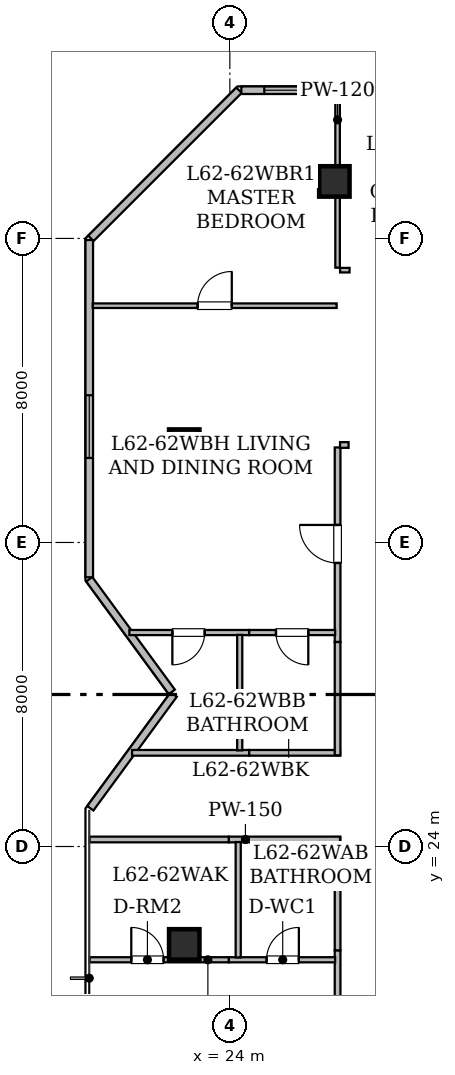
"""IFC4 building model, lengths in metres.
Left out: names, types, materials, properties, quantities, classifications, styles, units other than length and angle.
Written with IfcOpenShell. Run it as: python <this file> out.ifc"""

import sys

from ifc_helpers import new_model, si_unit, direction, frame, frame_2d, origin, origin_2d, place, context, subcontext, project, spatial, rectangle, hollow_rectangle, extrude, element, fill, save


model = new_model("IFC4")
c1 = context("Model", 3, precision=1e-05, world=origin(), true_north=direction((0.0, 1.0)))
c2 = subcontext(c1, "Body", "Model", "MODEL_VIEW")
j1 = project(units=[si_unit("LENGTHUNIT", "METRE"), si_unit("PLANEANGLEUNIT", "RADIAN")], contexts=[c1])
p1 = place(None, origin())
s1 = spatial("IfcSite", under=j1, at=p1, CompositionType="ELEMENT")
p2 = place(p1, origin())
s2 = spatial("IfcBuilding", under=s1, at=p2, CompositionType="ELEMENT")
p3 = place(p2, frame((0.0, 0.0, 242.75)))
s3 = spatial("IfcBuildingStorey", under=s2, at=p3, CompositionType="ELEMENT", Elevation=242.75)
for number, where, z_axis, x_axis in (
    (1, (26.75, 41.5, 0.0), (0.0, 0.0, 1.0), (1.0, 0.0, 0.0)),
    (2, (22.8, 21.425, 0.0), (0.0, 0.0, 1.0), (1.0, 0.0, 0.0)),
    (3, (22.8, 34.575, 0.0), (0.0, 0.0, 1.0), (1.0, 0.0, 0.0)),
):
    element("IfcColumn", number, at=place(p3, frame(where, z_axis=z_axis, x_axis=x_axis)), inside=s3, PredefinedType="COLUMN", context=c2, shape_type="SweptSolid", body=[
        extrude(hollow_rectangle(XDim=0.8, YDim=0.8, WallThickness=0.04, at=origin_2d()), origin(), (0.0, 0.0, 1.0), 3.65),
    ])
p4 = place(p3, frame((20.329, 25.007, 0.0), z_axis=(0.0, 0.0, 1.0), x_axis=(0.591366515379, 0.806402904564, 0.0)))
e4 = element("IfcWall", 4, at=p4, inside=s3, PredefinedType="STANDARD", context=c2, shape_type="SweptSolid", body=[
    extrude(rectangle(XDim=3.711, YDim=0.2, at=frame_2d((1.856, 0.0))), origin(), (0.0, 0.0, 1.0), 3.43),
])
p5 = place(p3, frame((22.473, 28.069, 0.0), z_axis=(0.0, 0.0, 1.0), x_axis=(-0.591248456881, 0.80648946815, 0.0)))
e5 = element("IfcWall", 5, at=p5, inside=s3, PredefinedType="STANDARD", context=c2, shape_type="SweptSolid", body=[
    extrude(rectangle(XDim=3.675, YDim=0.2, at=frame_2d((1.837, 0.0))), origin(), (0.0, 0.0, 1.0), 3.43),
])
p6 = place(p3, frame((20.3, 31.084, 0.0), z_axis=(0.0, 0.0, 1.0), x_axis=(0.0, 1.0, 0.0)))
e6 = element("IfcWall", 6, at=p6, inside=s3, PredefinedType="STANDARD", context=c2, shape_type="SweptSolid", body=[
    extrude(rectangle(XDim=8.875, YDim=0.2, at=frame_2d((4.438, 0.0))), origin(), (0.0, 0.0, 1.0), 3.43),
])
p7 = place(p6, frame((3.14, 0.0, 0.85)))
e7 = element("IfcOpeningElement", 7, at=p7, cuts=e6, PredefinedType="OPENING", context=c2, shape_type="SweptSolid", body=[
    extrude(rectangle(XDim=1.65, YDim=1.55, at=frame_2d((0.825, 0.775))), frame((0.0, 0.11, 0.0), z_axis=(0.0, -1.0, 0.0), x_axis=(1.0, 0.0, 0.0)), (0.0, 0.0, 1.0), 0.22),
])
p8 = place(p3, frame((20.344, 40.003, 0.0), z_axis=(0.0, 0.0, 1.0), x_axis=(0.707106781187, 0.707106781187, 0.0)))
e8 = element("IfcWall", 8, at=p8, inside=s3, PredefinedType="STANDARD", context=c2, shape_type="SweptSolid", body=[
    extrude(rectangle(XDim=5.511, YDim=0.2, at=frame_2d((2.756, 0.0))), origin(), (0.0, 0.0, 1.0), 3.43),
])
p9 = place(p3, frame((24.302, 43.9, 0.0), z_axis=(0.0, 0.0, 1.0), x_axis=(1.0, 0.0, 0.0)))
e9 = element("IfcWall", 9, at=p9, inside=s3, PredefinedType="STANDARD", context=c2, shape_type="SweptSolid", body=[
    extrude(rectangle(XDim=41.457, YDim=0.2, at=frame_2d((20.729, 0.0))), origin(), (0.0, 0.0, 1.0), 3.43),
])
p10 = place(p9, frame((5.573, 0.0, 0.85)))
e10 = element("IfcOpeningElement", 10, at=p10, cuts=e9, PredefinedType="OPENING", context=c2, shape_type="SweptSolid", body=[
    extrude(rectangle(XDim=1.65, YDim=1.55, at=frame_2d((0.825, 0.775))), frame((0.0, 0.11, 0.0), z_axis=(0.0, -1.0, 0.0), x_axis=(1.0, 0.0, 0.0)), (0.0, 0.0, 1.0), 0.22),
])
p11 = place(p9, frame((0.604, 0.0, 0.85)))
e11 = element("IfcOpeningElement", 11, at=p11, cuts=e9, PredefinedType="OPENING", context=c2, shape_type="SweptSolid", body=[
    extrude(rectangle(XDim=1.65, YDim=1.55, at=frame_2d((0.825, 0.775))), frame((0.0, 0.11, 0.0), z_axis=(0.0, -1.0, 0.0), x_axis=(1.0, 0.0, 0.0)), (0.0, 0.0, 1.0), 0.22),
])
p12 = place(p9, frame((23.188, 0.0, 0.8)))
e12 = element("IfcOpeningElement", 12, at=p12, cuts=e9, PredefinedType="OPENING", context=c2, shape_type="SweptSolid", body=[
    extrude(rectangle(XDim=1.2, YDim=1.5, at=frame_2d((0.6, 0.75))), frame((0.0, 0.11, 0.0), z_axis=(0.0, -1.0, 0.0), x_axis=(1.0, 0.0, 0.0)), (0.0, 0.0, 1.0), 0.22),
])
p13 = place(p9, frame((19.333, 0.0, 0.85)))
e13 = element("IfcOpeningElement", 13, at=p13, cuts=e9, PredefinedType="OPENING", context=c2, shape_type="SweptSolid", body=[
    extrude(rectangle(XDim=1.65, YDim=1.55, at=frame_2d((0.825, 0.775))), frame((0.0, 0.11, 0.0), z_axis=(0.0, -1.0, 0.0), x_axis=(1.0, 0.0, 0.0)), (0.0, 0.0, 1.0), 0.22),
])
p14 = place(p9, frame((26.593, 0.0, 0.85)))
e14 = element("IfcOpeningElement", 14, at=p14, cuts=e9, PredefinedType="OPENING", context=c2, shape_type="SweptSolid", body=[
    extrude(rectangle(XDim=1.65, YDim=1.55, at=frame_2d((0.825, 0.775))), frame((0.0, 0.11, 0.0), z_axis=(0.0, -1.0, 0.0), x_axis=(1.0, 0.0, 0.0)), (0.0, 0.0, 1.0), 0.22),
])
p15 = place(p9, frame((32.843, 0.0, 0.85)))
e15 = element("IfcOpeningElement", 15, at=p15, cuts=e9, PredefinedType="OPENING", context=c2, shape_type="SweptSolid", body=[
    extrude(rectangle(XDim=1.65, YDim=1.55, at=frame_2d((0.825, 0.775))), frame((0.0, 0.11, 0.0), z_axis=(0.0, -1.0, 0.0), x_axis=(1.0, 0.0, 0.0)), (0.0, 0.0, 1.0), 0.22),
])
p16 = place(p3, frame((26.835, 16.9, 0.0), z_axis=(0.0, 0.0, 1.0), x_axis=(0.0, 1.0, 0.0)))
e16 = element("IfcWall", 16, at=p16, inside=s3, PredefinedType="STANDARD", context=c2, shape_type="SweptSolid", body=[
    extrude(rectangle(XDim=4.369, YDim=0.15, at=frame_2d((2.185, 0.0))), origin(), (0.0, 0.0, 1.0), 2.725),
])
p17 = place(p16, frame((1.663, 0.0, 0.0)))
e17 = element("IfcOpeningElement", 17, at=p17, cuts=e16, PredefinedType="OPENING", context=c2, shape_type="SweptSolid", body=[
    extrude(rectangle(XDim=1.0, YDim=2.15, at=frame_2d((0.5, 1.075))), frame((0.0, 0.085, 0.0), z_axis=(0.0, -1.0, 0.0), x_axis=(1.0, 0.0, 0.0)), (0.0, 0.0, 1.0), 0.17),
])
p18 = place(p3, frame((26.835, 21.269, 0.0), z_axis=(0.0, 0.0, 1.0), x_axis=(0.0, 1.0, 0.0)))
e18 = element("IfcWall", 18, at=p18, inside=s3, PredefinedType="STANDARD", context=c2, shape_type="SweptSolid", body=[
    extrude(rectangle(XDim=2.981, YDim=0.15, at=frame_2d((1.49, 0.0))), origin(), (0.0, 0.0, 1.0), 3.43),
])
p19 = place(p3, frame((26.898, 24.185, 0.0), z_axis=(0.0, 0.0, 1.0), x_axis=(-1.0, 0.0, 0.0)))
e19 = element("IfcWall", 19, at=p19, inside=s3, PredefinedType="STANDARD", context=c2, shape_type="SweptSolid", body=[
    extrude(rectangle(XDim=2.927, YDim=0.15, at=frame_2d((1.463, 0.0))), origin(), (0.0, 0.0, 1.0), 3.43),
])
p20 = place(p3, frame((23.971, 24.185, 0.0), z_axis=(0.0, 0.0, 1.0), x_axis=(-1.0, 0.0, 0.0)))
e20 = element("IfcWall", 20, at=p20, inside=s3, PredefinedType="STANDARD", context=c2, shape_type="SweptSolid", body=[
    extrude(rectangle(XDim=3.661, YDim=0.15, at=frame_2d((1.831, 0.0))), origin(), (0.0, 0.0, 1.0), 2.887),
])
p21 = place(p3, frame((26.835, 29.381, 0.0), z_axis=(0.0, 0.0, 1.0), x_axis=(0.0, 1.0, 0.0)))
e21 = element("IfcWall", 21, at=p21, inside=s3, PredefinedType="STANDARD", context=c2, shape_type="SweptSolid", body=[
    extrude(rectangle(XDim=5.119, YDim=0.15, at=frame_2d((2.56, 0.0))), origin(), (0.0, 0.0, 1.0), 3.107),
])
p22 = place(p21, frame((2.08, 0.0, 0.0)))
e22 = element("IfcOpeningElement", 22, at=p22, cuts=e21, PredefinedType="OPENING", context=c2, shape_type="SweptSolid", body=[
    extrude(rectangle(XDim=1.0, YDim=2.15, at=frame_2d((0.5, 1.075))), frame((0.0, 0.085, 0.0), z_axis=(0.0, -1.0, 0.0), x_axis=(1.0, 0.0, 0.0)), (0.0, 0.0, 1.0), 0.17),
])
p23 = place(p3, frame((26.9, 34.565, 0.0), z_axis=(0.0, 0.0, 1.0), x_axis=(1.0, 0.0, 0.0)))
e23 = element("IfcWall", 23, at=p23, inside=s3, PredefinedType="STANDARD", context=c2, shape_type="SweptSolid", body=[
    extrude(rectangle(XDim=0.224, YDim=0.15, at=frame_2d((0.112, 0.0))), origin(), (0.0, 0.0, 1.0), 3.43),
])
p24 = place(p3, frame((21.427, 26.465, 0.0), z_axis=(0.0, 0.0, 1.0), x_axis=(1.0, 0.0, 0.0)))
e24 = element("IfcWall", 24, at=p24, inside=s3, PredefinedType="STANDARD", context=c2, shape_type="SweptSolid", body=[
    extrude(rectangle(XDim=3.082, YDim=0.15, at=frame_2d((1.541, 0.0))), origin(), (0.0, 0.0, 1.0), 2.887),
])
p25 = place(p3, frame((24.509, 26.465, 0.0), z_axis=(0.0, 0.0, 1.0), x_axis=(1.0, 0.0, 0.0)))
e25 = element("IfcWall", 25, at=p25, inside=s3, PredefinedType="STANDARD", context=c2, shape_type="SweptSolid", body=[
    extrude(rectangle(XDim=2.391, YDim=0.15, at=frame_2d((1.195, 0.0))), origin(), (0.0, 0.0, 1.0), 3.43),
])
p26 = place(p3, frame((26.835, 26.4, 0.0), z_axis=(0.0, 0.0, 1.0), x_axis=(0.0, 1.0, 0.0)))
e26 = element("IfcWall", 26, at=p26, inside=s3, PredefinedType="STANDARD", context=c2, shape_type="SweptSolid", body=[
    extrude(rectangle(XDim=2.981, YDim=0.15, at=frame_2d((1.491, 0.0))), origin(), (0.0, 0.0, 1.0), 3.43),
])
p27 = place(p3, frame((27.15, 39.165, 0.0), z_axis=(0.0, 0.0, 1.0), x_axis=(-1.0, 0.0, 0.0)))
e27 = element("IfcWall", 27, at=p27, inside=s3, PredefinedType="PARTITIONING", context=c2, shape_type="SweptSolid", body=[
    extrude(rectangle(XDim=0.25, YDim=0.12, at=frame_2d((0.125, 0.0))), origin(), (0.0, 0.0, 1.0), 3.43),
])
p28 = place(p3, frame((26.835, 39.23, 0.0), z_axis=(0.0, 0.0, 1.0), x_axis=(0.0, 1.0, 0.0)))
e28 = element("IfcWall", 28, at=p28, inside=s3, PredefinedType="PARTITIONING", context=c2, shape_type="SweptSolid", body=[
    extrude(rectangle(XDim=4.578, YDim=0.12, at=frame_2d((2.289, 0.0))), origin(), (0.0, 0.0, 1.0), 2.725),
])
p29 = place(p3, frame((23.971, 21.02, 0.0), z_axis=(0.0, 0.0, 1.0), x_axis=(1.0, 0.0, 0.0)))
e29 = element("IfcWall", 29, at=p29, inside=s3, PredefinedType="PARTITIONING", context=c2, shape_type="SweptSolid", body=[
    extrude(rectangle(XDim=2.799, YDim=0.135, at=frame_2d((1.399, 0.0))), origin(), (0.0, 0.0, 1.0), 2.725),
])
p30 = place(p29, frame((0.995, 0.0, 0.0)))
e30 = element("IfcOpeningElement", 30, at=p30, cuts=e29, PredefinedType="OPENING", context=c2, shape_type="SweptSolid", body=[
    extrude(rectangle(XDim=0.85, YDim=2.1, at=frame_2d((0.425, 1.05))), frame((0.0, 0.077, 0.0), z_axis=(0.0, -1.0, 0.0), x_axis=(1.0, 0.0, 0.0)), (0.0, 0.0, 1.0), 0.155),
])
p31 = place(p3, frame((20.31, 21.02, 0.0), z_axis=(0.0, 0.0, 1.0), x_axis=(1.0, 0.0, 0.0)))
e31 = element("IfcWall", 31, at=p31, inside=s3, PredefinedType="PARTITIONING", context=c2, shape_type="SweptSolid", body=[
    extrude(rectangle(XDim=3.661, YDim=0.135, at=frame_2d((1.831, 0.0))), origin(), (0.0, 0.0, 1.0), 2.725),
])
p32 = place(p31, frame((1.096, 0.0, 0.0)))
e32 = element("IfcOpeningElement", 32, at=p32, cuts=e31, PredefinedType="OPENING", context=c2, shape_type="SweptSolid", body=[
    extrude(rectangle(XDim=0.85, YDim=2.1, at=frame_2d((0.425, 1.05))), frame((0.0, 0.077, 0.0), z_axis=(0.0, -1.0, 0.0), x_axis=(1.0, 0.0, 0.0)), (0.0, 0.0, 1.0), 0.155),
])
p33 = place(p3, frame((24.22, 21.081, 0.0), z_axis=(0.0, 0.0, 1.0), x_axis=(0.0, 1.0, 0.0)))
e33 = element("IfcWall", 33, at=p33, inside=s3, PredefinedType="PARTITIONING", context=c2, shape_type="SweptSolid", body=[
    extrude(rectangle(XDim=3.037, YDim=0.135, at=frame_2d((1.519, 0.0))), origin(), (0.0, 0.0, 1.0), 3.43),
])
p34 = place(p3, frame((24.509, 29.63, 0.0), z_axis=(0.0, 0.0, 1.0), x_axis=(-1.0, 0.0, 0.0)))
e34 = element("IfcWall", 34, at=p34, inside=s3, PredefinedType="PARTITIONING", context=c2, shape_type="SweptSolid", body=[
    extrude(rectangle(XDim=3.153, YDim=0.135, at=frame_2d((1.577, 0.0))), origin(), (0.0, 0.0, 1.0), 2.887),
])
p35 = place(p34, frame((1.172, 0.0, 0.0)))
e35 = element("IfcOpeningElement", 35, at=p35, cuts=e34, PredefinedType="OPENING", context=c2, shape_type="SweptSolid", body=[
    extrude(rectangle(XDim=0.85, YDim=2.1, at=frame_2d((0.425, 1.05))), frame((0.0, 0.077, 0.0), z_axis=(0.0, -1.0, 0.0), x_axis=(1.0, 0.0, 0.0)), (0.0, 0.0, 1.0), 0.155),
])
p36 = place(p3, frame((26.77, 29.63, 0.0), z_axis=(0.0, 0.0, 1.0), x_axis=(-1.0, 0.0, 0.0)))
e36 = element("IfcWall", 36, at=p36, inside=s3, PredefinedType="PARTITIONING", context=c2, shape_type="SweptSolid", body=[
    extrude(rectangle(XDim=2.261, YDim=0.135, at=frame_2d((1.13, 0.0))), origin(), (0.0, 0.0, 1.0), 3.43),
])
p37 = place(p36, frame((0.706, 0.0, 0.0)))
e37 = element("IfcOpeningElement", 37, at=p37, cuts=e36, PredefinedType="OPENING", context=c2, shape_type="SweptSolid", body=[
    extrude(rectangle(XDim=0.85, YDim=2.1, at=frame_2d((0.425, 1.05))), frame((0.0, 0.077, 0.0), z_axis=(0.0, -1.0, 0.0), x_axis=(1.0, 0.0, 0.0)), (0.0, 0.0, 1.0), 0.155),
])
p38 = place(p3, frame((20.392, 38.23, 0.0), z_axis=(0.0, 0.0, 1.0), x_axis=(1.0, 0.0, 0.0)))
e38 = element("IfcWall", 38, at=p38, inside=s3, PredefinedType="PARTITIONING", context=c2, shape_type="SweptSolid", body=[
    extrude(rectangle(XDim=6.418, YDim=0.12, at=frame_2d((3.209, 0.0))), origin(), (0.0, 0.0, 1.0), 2.887),
])
p39 = place(p38, frame((2.759, 0.0, 0.0)))
e39 = element("IfcOpeningElement", 39, at=p39, cuts=e38, PredefinedType="OPENING", context=c2, shape_type="SweptSolid", body=[
    extrude(rectangle(XDim=0.9, YDim=2.1, at=frame_2d((0.45, 1.05))), frame((0.0, 0.07, 0.0), z_axis=(0.0, -1.0, 0.0), x_axis=(1.0, 0.0, 0.0)), (0.0, 0.0, 1.0), 0.14),
])
p40 = place(p3, frame((24.26, 29.569, 0.0), z_axis=(0.0, 0.0, 1.0), x_axis=(0.0, -1.0, 0.0)))
e40 = element("IfcWall", 40, at=p40, inside=s3, PredefinedType="PARTITIONING", context=c2, shape_type="SweptSolid", body=[
    extrude(rectangle(XDim=3.039, YDim=0.135, at=frame_2d((1.52, 0.0))), origin(), (0.0, 0.0, 1.0), 3.43),
])
p41 = place(p7, origin())
e41 = element("IfcWindow", 41, at=p41, inside=s3, PartitioningType="SINGLE_PANEL", PredefinedType="WINDOW", context=c2, shape_type="SweptSolid", body=[
    extrude(rectangle(XDim=1.65, YDim=1.55, at=frame_2d((0.825, 0.775))), frame((0.0, 0.03, 0.0), z_axis=(0.0, -1.0, 0.0), x_axis=(1.0, 0.0, 0.0)), (0.0, 0.0, 1.0), 0.06),
])
fill(e7, e41)
p42 = place(p11, origin())
e42 = element("IfcWindow", 42, at=p42, inside=s3, PartitioningType="SINGLE_PANEL", PredefinedType="WINDOW", context=c2, shape_type="SweptSolid", body=[
    extrude(rectangle(XDim=1.65, YDim=1.55, at=frame_2d((0.825, 0.775))), frame((0.0, 0.03, 0.0), z_axis=(0.0, -1.0, 0.0), x_axis=(1.0, 0.0, 0.0)), (0.0, 0.0, 1.0), 0.06),
])
fill(e11, e42)
p43 = place(p22, origin())
e43 = element("IfcDoor", 43, at=p43, inside=s3, OperationType="SINGLE_SWING_RIGHT", PredefinedType="DOOR", context=c2, shape_type="SweptSolid", body=[
    extrude(rectangle(XDim=1.0, YDim=2.15, at=frame_2d((0.5, 1.075))), frame((0.0, 0.025, 0.0), z_axis=(0.0, -1.0, 0.0), x_axis=(1.0, 0.0, 0.0)), (0.0, 0.0, 1.0), 0.05),
])
fill(e22, e43)
p44 = place(p30, origin())
e44 = element("IfcDoor", 44, at=p44, inside=s3, OperationType="SINGLE_SWING_RIGHT", PredefinedType="DOOR", context=c2, shape_type="SweptSolid", body=[
    extrude(rectangle(XDim=0.85, YDim=2.1, at=frame_2d((0.425, 1.05))), frame((0.0, 0.025, 0.0), z_axis=(0.0, -1.0, 0.0), x_axis=(1.0, 0.0, 0.0)), (0.0, 0.0, 1.0), 0.05),
])
fill(e30, e44)
p45 = place(p32, origin())
e45 = element("IfcDoor", 45, at=p45, inside=s3, OperationType="SINGLE_SWING_LEFT", PredefinedType="DOOR", context=c2, shape_type="SweptSolid", body=[
    extrude(rectangle(XDim=0.85, YDim=2.1, at=frame_2d((0.425, 1.05))), frame((0.0, 0.025, 0.0), z_axis=(0.0, -1.0, 0.0), x_axis=(1.0, 0.0, 0.0)), (0.0, 0.0, 1.0), 0.05),
])
fill(e32, e45)
p46 = place(p35, origin())
e46 = element("IfcDoor", 46, at=p46, inside=s3, OperationType="SINGLE_SWING_RIGHT", PredefinedType="DOOR", context=c2, shape_type="SweptSolid", body=[
    extrude(rectangle(XDim=0.85, YDim=2.1, at=frame_2d((0.425, 1.05))), frame((0.0, 0.025, 0.0), z_axis=(0.0, -1.0, 0.0), x_axis=(1.0, 0.0, 0.0)), (0.0, 0.0, 1.0), 0.05),
])
fill(e35, e46)
p47 = place(p37, origin())
e47 = element("IfcDoor", 47, at=p47, inside=s3, OperationType="SINGLE_SWING_LEFT", PredefinedType="DOOR", context=c2, shape_type="SweptSolid", body=[
    extrude(rectangle(XDim=0.85, YDim=2.1, at=frame_2d((0.425, 1.05))), frame((0.0, 0.025, 0.0), z_axis=(0.0, -1.0, 0.0), x_axis=(1.0, 0.0, 0.0)), (0.0, 0.0, 1.0), 0.05),
])
fill(e37, e47)
p48 = place(p39, origin())
e48 = element("IfcDoor", 48, at=p48, inside=s3, OperationType="SINGLE_SWING_RIGHT", PredefinedType="DOOR", context=c2, shape_type="SweptSolid", body=[
    extrude(rectangle(XDim=0.9, YDim=2.1, at=frame_2d((0.45, 1.05))), frame((0.0, 0.025, 0.0), z_axis=(0.0, -1.0, 0.0), x_axis=(1.0, 0.0, 0.0)), (0.0, 0.0, 1.0), 0.05),
])
fill(e39, e48)
save(model, sys.argv[1])
